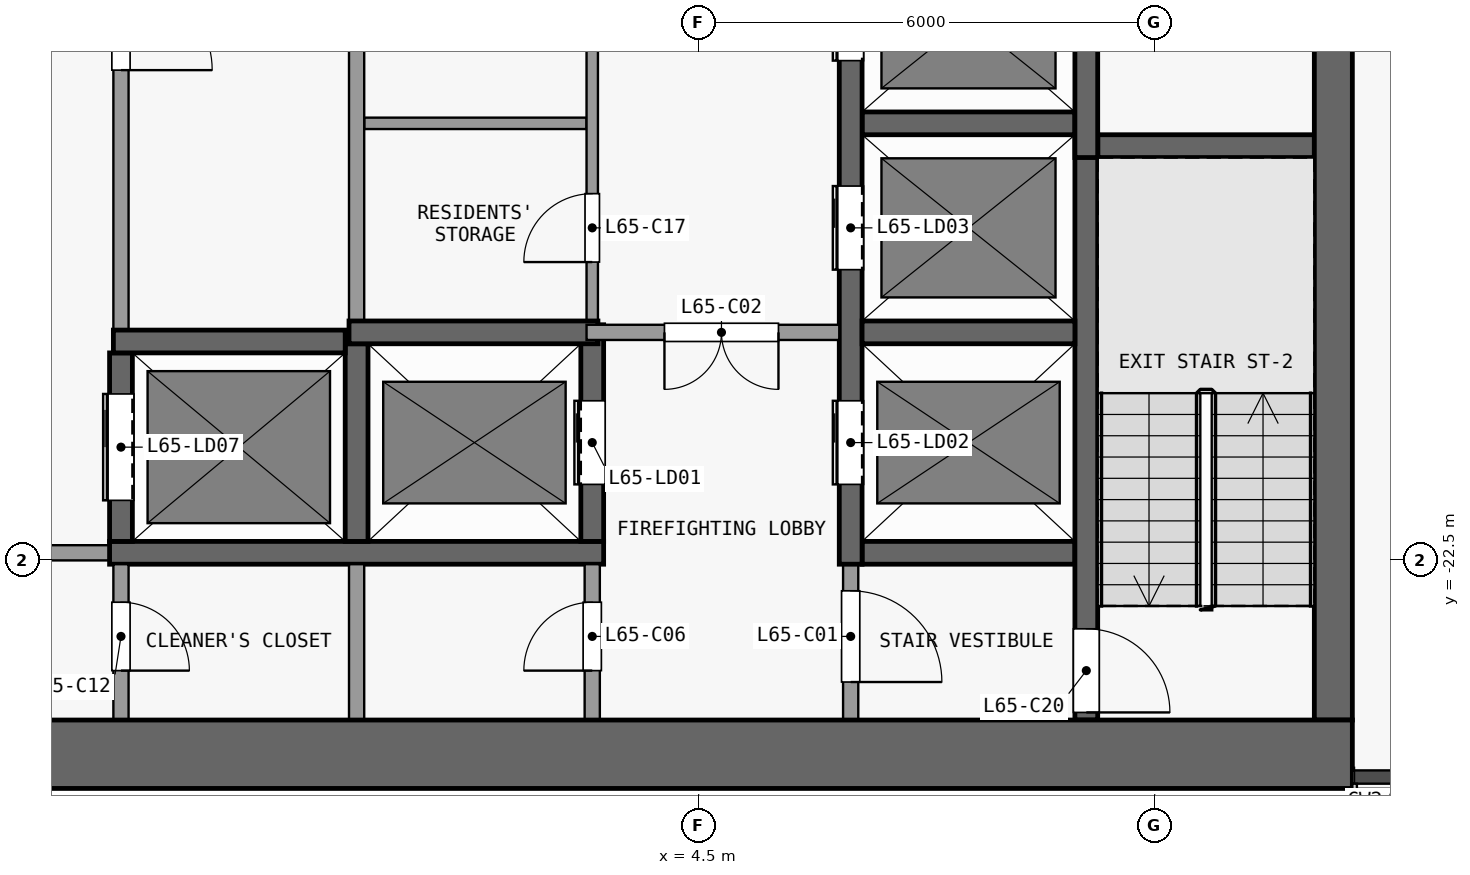
"""IFC4 building model, lengths in metres.
Left out: names, types, materials, properties, quantities, classifications, styles, units other than length and angle.
Written with IfcOpenShell. Run it as: python <this file> out.ifc"""

import sys

from ifc_helpers import new_model, si_unit, direction, frame, frame_2d, origin, place, context, subcontext, project, spatial, rectangle, extrude, element, fill, save


model = new_model("IFC4")
c1 = context("Model", 3, precision=1e-05, world=origin(), true_north=direction((0.0, 1.0)))
c2 = subcontext(c1, "Body", "Model", "MODEL_VIEW")
j1 = project(units=[si_unit("LENGTHUNIT", "METRE"), si_unit("PLANEANGLEUNIT", "RADIAN")], contexts=[c1])
p1 = place(None, origin())
s1 = spatial("IfcSite", under=j1, at=p1, CompositionType="ELEMENT")
p2 = place(p1, origin())
s2 = spatial("IfcBuilding", under=s1, at=p2, CompositionType="ELEMENT")
p3 = place(p2, frame((0.0, 0.0, 259.1)))
s3 = spatial("IfcBuildingStorey", under=s2, at=p3, CompositionType="ELEMENT", Elevation=259.1)
p4 = place(p3, frame((-13.1, -25.05, 0.0), z_axis=(0.0, 0.0, 1.0), x_axis=(1.0, 0.0, 0.0)))
e1 = element("IfcWall", 1, at=p4, inside=s3, PredefinedType="SHEAR", context=c2, shape_type="SweptSolid", body=[
    extrude(rectangle(XDim=26.2, YDim=0.9, at=frame_2d((13.1, 0.0))), origin(), (0.0, 0.0, 1.0), 3.3),
])
p5 = place(p3, frame((12.85, -24.6, 0.0), z_axis=(0.0, 0.0, 1.0), x_axis=(0.0, 1.0, 0.0)))
e2 = element("IfcWall", 2, at=p5, inside=s3, PredefinedType="SHEAR", context=c2, shape_type="SweptSolid", body=[
    extrude(rectangle(XDim=16.1, YDim=0.5, at=frame_2d((8.05, 0.0))), origin(), (0.0, 0.0, 1.0), 3.3),
])
p6 = place(p3, frame((-3.25, -22.4, 0.0), z_axis=(0.0, 0.0, 1.0), x_axis=(-1.0, 0.0, 0.0)))
e3 = element("IfcWall", 3, at=p6, inside=s3, PredefinedType="PARTITIONING", context=c2, shape_type="SweptSolid", body=[
    extrude(rectangle(XDim=6.2, YDim=0.2, at=frame_2d((3.1, 0.0))), origin(), (0.0, 0.0, 1.0), 3.3),
])
p7 = place(p6, frame((0.8, 0.0, 0.0)))
e4 = element("IfcOpeningElement", 4, at=p7, cuts=e3, PredefinedType="OPENING", context=c2, shape_type="SweptSolid", body=[
    extrude(rectangle(XDim=1.5, YDim=2.1, at=frame_2d((0.75, 1.05))), frame((0.0, 0.11, 0.0), z_axis=(0.0, -1.0, 0.0), x_axis=(1.0, 0.0, 0.0)), (0.0, 0.0, 1.0), 0.22),
])
p8 = place(p3, frame((-3.25, -22.4, 0.0), z_axis=(0.0, 0.0, 1.0), x_axis=(1.0, 0.0, 0.0)))
e5 = element("IfcWall", 5, at=p8, inside=s3, PredefinedType="SHEAR", context=c2, shape_type="SweptSolid", body=[
    extrude(rectangle(XDim=6.5, YDim=0.3, at=frame_2d((3.25, 0.0))), origin(), (0.0, 0.0, 1.0), 3.3),
])
p9 = place(p3, frame((6.65, -22.4, 0.0), z_axis=(0.0, 0.0, 1.0), x_axis=(1.0, 0.0, 0.0)))
e6 = element("IfcWall", 6, at=p9, inside=s3, PredefinedType="SHEAR", context=c2, shape_type="SweptSolid", body=[
    extrude(rectangle(XDim=2.8, YDim=0.3, at=frame_2d((1.4, 0.0))), origin(), (0.0, 0.0, 1.0), 3.3),
])
p10 = place(p3, frame((-3.2, -19.62, 0.0), z_axis=(0.0, 0.0, 1.0), x_axis=(1.0, 0.0, 0.0)))
e7 = element("IfcWall", 7, at=p10, inside=s3, PredefinedType="SHEAR", context=c2, shape_type="SweptSolid", body=[
    extrude(rectangle(XDim=3.05, YDim=0.3, at=frame_2d((1.525, 0.0))), origin(), (0.0, 0.0, 1.0), 3.3),
])
p11 = place(p3, frame((-0.1, -19.5, 0.0), z_axis=(0.0, 0.0, 1.0), x_axis=(1.0, 0.0, 0.0)))
e8 = element("IfcWall", 8, at=p11, inside=s3, PredefinedType="SHEAR", context=c2, shape_type="SweptSolid", body=[
    extrude(rectangle(XDim=3.275, YDim=0.3, at=frame_2d((1.638, 0.0))), origin(), (0.0, 0.0, 1.0), 3.3),
])
p12 = place(p3, frame((6.35, -19.5, 0.0), z_axis=(0.0, 0.0, 1.0), x_axis=(-1.0, 0.0, 0.0)))
e9 = element("IfcWall", 9, at=p12, inside=s3, PredefinedType="PARTITIONING", context=c2, shape_type="SweptSolid", body=[
    extrude(rectangle(XDim=3.325, YDim=0.2, at=frame_2d((1.663, 0.0))), origin(), (0.0, 0.0, 1.0), 3.3),
])
p13 = place(p12, frame((0.8, 0.0, 0.0)))
e10 = element("IfcOpeningElement", 10, at=p13, cuts=e9, PredefinedType="OPENING", context=c2, shape_type="SweptSolid", body=[
    extrude(rectangle(XDim=1.5, YDim=2.1, at=frame_2d((0.75, 1.05))), frame((0.0, 0.11, 0.0), z_axis=(0.0, -1.0, 0.0), x_axis=(1.0, 0.0, 0.0)), (0.0, 0.0, 1.0), 0.22),
])
p14 = place(p3, frame((6.65, -19.5, 0.0), z_axis=(0.0, 0.0, 1.0), x_axis=(1.0, 0.0, 0.0)))
e11 = element("IfcWall", 11, at=p14, inside=s3, PredefinedType="SHEAR", context=c2, shape_type="SweptSolid", body=[
    extrude(rectangle(XDim=2.8, YDim=0.3, at=frame_2d((1.4, 0.0))), origin(), (0.0, 0.0, 1.0), 3.3),
])
p15 = place(p3, frame((9.75, -17.05, 0.0), z_axis=(0.0, 0.0, 1.0), x_axis=(1.0, 0.0, 0.0)))
e12 = element("IfcWall", 12, at=p15, inside=s3, PredefinedType="SHEAR", context=c2, shape_type="SweptSolid", body=[
    extrude(rectangle(XDim=2.85, YDim=0.3, at=frame_2d((1.425, 0.0))), origin(), (0.0, 0.0, 1.0), 3.3),
])
p16 = place(p3, frame((0.1, -16.75, 0.0), z_axis=(0.0, 0.0, 1.0), x_axis=(1.0, 0.0, 0.0)))
e13 = element("IfcWall", 13, at=p16, inside=s3, PredefinedType="PARTITIONING", context=c2, shape_type="SweptSolid", body=[
    extrude(rectangle(XDim=2.925, YDim=0.15, at=frame_2d((1.462, 0.0))), origin(), (0.0, 0.0, 1.0), 3.3),
])
p17 = place(p3, frame((6.65, -16.75, 0.0), z_axis=(0.0, 0.0, 1.0), x_axis=(1.0, 0.0, 0.0)))
e14 = element("IfcWall", 14, at=p17, inside=s3, PredefinedType="SHEAR", context=c2, shape_type="SweptSolid", body=[
    extrude(rectangle(XDim=2.8, YDim=0.3, at=frame_2d((1.4, 0.0))), origin(), (0.0, 0.0, 1.0), 3.3),
])
p18 = place(p3, frame((-3.1, -22.55, 0.0), z_axis=(0.0, 0.0, 1.0), x_axis=(0.0, -1.0, 0.0)))
e15 = element("IfcWall", 15, at=p18, inside=s3, PredefinedType="PARTITIONING", context=c2, shape_type="SweptSolid", body=[
    extrude(rectangle(XDim=2.05, YDim=0.2, at=frame_2d((1.025, 0.0))), origin(), (0.0, 0.0, 1.0), 3.3),
])
p19 = place(p18, frame((0.5, 0.0, 0.0)))
e16 = element("IfcOpeningElement", 16, at=p19, cuts=e15, PredefinedType="OPENING", context=c2, shape_type="SweptSolid", body=[
    extrude(rectangle(XDim=0.9, YDim=2.1, at=frame_2d((0.45, 1.05))), frame((0.0, 0.11, 0.0), z_axis=(0.0, -1.0, 0.0), x_axis=(1.0, 0.0, 0.0)), (0.0, 0.0, 1.0), 0.22),
])
p20 = place(p3, frame((-3.1, -22.25, 0.0), z_axis=(0.0, 0.0, 1.0), x_axis=(0.0, 1.0, 0.0)))
e17 = element("IfcWall", 17, at=p20, inside=s3, PredefinedType="SHEAR", context=c2, shape_type="SweptSolid", body=[
    extrude(rectangle(XDim=2.48, YDim=0.3, at=frame_2d((1.24, 0.0))), origin(), (0.0, 0.0, 1.0), 3.3),
])
p21 = place(p20, frame((0.54, 0.0, 0.0)))
e18 = element("IfcOpeningElement", 18, at=p21, cuts=e17, PredefinedType="OPENING", context=c2, shape_type="SweptSolid", body=[
    extrude(rectangle(XDim=1.4, YDim=2.1, at=frame_2d((0.7, 1.05))), frame((0.0, 0.16, 0.0), z_axis=(0.0, -1.0, 0.0), x_axis=(1.0, 0.0, 0.0)), (0.0, 0.0, 1.0), 0.32),
])
p22 = place(p3, frame((-3.1, -8.5, 0.0), z_axis=(0.0, 0.0, 1.0), x_axis=(0.0, -1.0, 0.0)))
e19 = element("IfcWall", 19, at=p22, inside=s3, PredefinedType="PARTITIONING", context=c2, shape_type="SweptSolid", body=[
    extrude(rectangle(XDim=10.97, YDim=0.2, at=frame_2d((5.485, 0.0))), origin(), (0.0, 0.0, 1.0), 3.3),
])
p23 = place(p22, frame((6.35, 0.0, 0.0)))
e20 = element("IfcOpeningElement", 20, at=p23, cuts=e19, PredefinedType="OPENING", context=c2, shape_type="SweptSolid", body=[
    extrude(rectangle(XDim=1.2, YDim=2.1, at=frame_2d((0.6, 1.05))), frame((0.0, 0.11, 0.0), z_axis=(0.0, -1.0, 0.0), x_axis=(1.0, 0.0, 0.0)), (0.0, 0.0, 1.0), 0.22),
])
p24 = place(p22, frame((0.94, 0.0, 0.0)))
e21 = element("IfcOpeningElement", 21, at=p24, cuts=e19, PredefinedType="OPENING", context=c2, shape_type="SweptSolid", body=[
    extrude(rectangle(XDim=0.9, YDim=2.1, at=frame_2d((0.45, 1.05))), frame((0.0, 0.11, 0.0), z_axis=(0.0, -1.0, 0.0), x_axis=(1.0, 0.0, 0.0)), (0.0, 0.0, 1.0), 0.22),
])
p25 = place(p3, frame((0.0, -24.6, 0.0), z_axis=(0.0, 0.0, 1.0), x_axis=(0.0, 1.0, 0.0)))
e22 = element("IfcWall", 22, at=p25, inside=s3, PredefinedType="PARTITIONING", context=c2, shape_type="SweptSolid", body=[
    extrude(rectangle(XDim=2.05, YDim=0.2, at=frame_2d((1.025, 0.0))), origin(), (0.0, 0.0, 1.0), 3.3),
])
p26 = place(p3, frame((0.0, -22.25, 0.0), z_axis=(0.0, 0.0, 1.0), x_axis=(0.0, 1.0, 0.0)))
e23 = element("IfcWall", 23, at=p26, inside=s3, PredefinedType="SHEAR", context=c2, shape_type="SweptSolid", body=[
    extrude(rectangle(XDim=2.6, YDim=0.3, at=frame_2d((1.3, 0.0))), origin(), (0.0, 0.0, 1.0), 3.3),
])
p27 = place(p3, frame((0.0, -19.35, 0.0), z_axis=(0.0, 0.0, 1.0), x_axis=(0.0, 1.0, 0.0)))
e24 = element("IfcWall", 24, at=p27, inside=s3, PredefinedType="PARTITIONING", context=c2, shape_type="SweptSolid", body=[
    extrude(rectangle(XDim=10.85, YDim=0.2, at=frame_2d((5.425, 0.0))), origin(), (0.0, 0.0, 1.0), 3.3),
])
p28 = place(p3, frame((3.1, -24.6, 0.0), z_axis=(0.0, 0.0, 1.0), x_axis=(0.0, 1.0, 0.0)))
e25 = element("IfcWall", 25, at=p28, inside=s3, PredefinedType="PARTITIONING", context=c2, shape_type="SweptSolid", body=[
    extrude(rectangle(XDim=2.05, YDim=0.2, at=frame_2d((1.025, 0.0))), origin(), (0.0, 0.0, 1.0), 3.3),
])
p29 = place(p28, frame((0.65, 0.0, 0.0)))
e26 = element("IfcOpeningElement", 26, at=p29, cuts=e25, PredefinedType="OPENING", context=c2, shape_type="SweptSolid", body=[
    extrude(rectangle(XDim=0.9, YDim=2.1, at=frame_2d((0.45, 1.05))), frame((0.0, 0.11, 0.0), z_axis=(0.0, -1.0, 0.0), x_axis=(1.0, 0.0, 0.0)), (0.0, 0.0, 1.0), 0.22),
])
p30 = place(p3, frame((3.1, -22.25, 0.0), z_axis=(0.0, 0.0, 1.0), x_axis=(0.0, 1.0, 0.0)))
e27 = element("IfcWall", 27, at=p30, inside=s3, PredefinedType="SHEAR", context=c2, shape_type="SweptSolid", body=[
    extrude(rectangle(XDim=2.85, YDim=0.3, at=frame_2d((1.425, 0.0))), origin(), (0.0, 0.0, 1.0), 3.3),
])
p31 = place(p30, frame((0.75, 0.0, 0.0)))
e28 = element("IfcOpeningElement", 28, at=p31, cuts=e27, PredefinedType="OPENING", context=c2, shape_type="SweptSolid", body=[
    extrude(rectangle(XDim=1.1, YDim=2.1, at=frame_2d((0.55, 1.05))), frame((0.0, 0.16, 0.0), z_axis=(0.0, -1.0, 0.0), x_axis=(1.0, 0.0, 0.0)), (0.0, 0.0, 1.0), 0.32),
])
p32 = place(p3, frame((3.1, -19.4, 0.0), z_axis=(0.0, 0.0, 1.0), x_axis=(0.0, 1.0, 0.0)))
e29 = element("IfcWall", 29, at=p32, inside=s3, PredefinedType="PARTITIONING", context=c2, shape_type="SweptSolid", body=[
    extrude(rectangle(XDim=10.9, YDim=0.15, at=frame_2d((5.45, 0.0))), origin(), (0.0, 0.0, 1.0), 3.3),
])
p33 = place(p32, frame((0.825, 0.0, 0.0)))
e30 = element("IfcOpeningElement", 30, at=p33, cuts=e29, PredefinedType="OPENING", context=c2, shape_type="SweptSolid", body=[
    extrude(rectangle(XDim=0.9, YDim=2.1, at=frame_2d((0.45, 1.05))), frame((0.0, 0.085, 0.0), z_axis=(0.0, -1.0, 0.0), x_axis=(1.0, 0.0, 0.0)), (0.0, 0.0, 1.0), 0.17),
])
p34 = place(p32, frame((6.175, 0.0, 0.0)))
e31 = element("IfcOpeningElement", 31, at=p34, cuts=e29, PredefinedType="OPENING", context=c2, shape_type="SweptSolid", body=[
    extrude(rectangle(XDim=1.2, YDim=2.1, at=frame_2d((0.6, 1.05))), frame((0.0, 0.085, 0.0), z_axis=(0.0, -1.0, 0.0), x_axis=(1.0, 0.0, 0.0)), (0.0, 0.0, 1.0), 0.17),
])
p35 = place(p3, frame((6.5, -22.55, 0.0), z_axis=(0.0, 0.0, 1.0), x_axis=(0.0, -1.0, 0.0)))
e32 = element("IfcWall", 32, at=p35, inside=s3, PredefinedType="PARTITIONING", context=c2, shape_type="SweptSolid", body=[
    extrude(rectangle(XDim=2.05, YDim=0.2, at=frame_2d((1.025, 0.0))), origin(), (0.0, 0.0, 1.0), 3.3),
])
p36 = place(p35, frame((0.35, 0.0, 0.0)))
e33 = element("IfcOpeningElement", 33, at=p36, cuts=e32, PredefinedType="OPENING", context=c2, shape_type="SweptSolid", body=[
    extrude(rectangle(XDim=1.2, YDim=2.1, at=frame_2d((0.6, 1.05))), frame((0.0, 0.11, 0.0), z_axis=(0.0, -1.0, 0.0), x_axis=(1.0, 0.0, 0.0)), (0.0, 0.0, 1.0), 0.22),
])
p37 = place(p3, frame((6.5, -22.55, 0.0), z_axis=(0.0, 0.0, 1.0), x_axis=(0.0, 1.0, 0.0)))
e34 = element("IfcWall", 34, at=p37, inside=s3, PredefinedType="SHEAR", context=c2, shape_type="SweptSolid", body=[
    extrude(rectangle(XDim=14.05, YDim=0.3, at=frame_2d((7.025, 0.0))), origin(), (0.0, 0.0, 1.0), 3.3),
])
p38 = place(p37, frame((1.05, 0.0, 0.0)))
e35 = element("IfcOpeningElement", 35, at=p38, cuts=e34, PredefinedType="OPENING", context=c2, shape_type="SweptSolid", body=[
    extrude(rectangle(XDim=1.1, YDim=2.1, at=frame_2d((0.55, 1.05))), frame((0.0, 0.16, 0.0), z_axis=(0.0, -1.0, 0.0), x_axis=(1.0, 0.0, 0.0)), (0.0, 0.0, 1.0), 0.32),
])
p39 = place(p37, frame((3.875, 0.0, 0.0)))
e36 = element("IfcOpeningElement", 36, at=p39, cuts=e34, PredefinedType="OPENING", context=c2, shape_type="SweptSolid", body=[
    extrude(rectangle(XDim=1.1, YDim=2.1, at=frame_2d((0.55, 1.05))), frame((0.0, 0.16, 0.0), z_axis=(0.0, -1.0, 0.0), x_axis=(1.0, 0.0, 0.0)), (0.0, 0.0, 1.0), 0.32),
])
p40 = place(p37, frame((6.625, 0.0, 0.0)))
e37 = element("IfcOpeningElement", 37, at=p40, cuts=e34, PredefinedType="OPENING", context=c2, shape_type="SweptSolid", body=[
    extrude(rectangle(XDim=1.1, YDim=2.1, at=frame_2d((0.55, 1.05))), frame((0.0, 0.16, 0.0), z_axis=(0.0, -1.0, 0.0), x_axis=(1.0, 0.0, 0.0)), (0.0, 0.0, 1.0), 0.32),
])
p41 = place(p37, frame((9.375, 0.0, 0.0)))
e38 = element("IfcOpeningElement", 38, at=p41, cuts=e34, PredefinedType="OPENING", context=c2, shape_type="SweptSolid", body=[
    extrude(rectangle(XDim=1.1, YDim=2.1, at=frame_2d((0.55, 1.05))), frame((0.0, 0.16, 0.0), z_axis=(0.0, -1.0, 0.0), x_axis=(1.0, 0.0, 0.0)), (0.0, 0.0, 1.0), 0.32),
])
p42 = place(p37, frame((12.125, 0.0, 0.0)))
e39 = element("IfcOpeningElement", 39, at=p42, cuts=e34, PredefinedType="OPENING", context=c2, shape_type="SweptSolid", body=[
    extrude(rectangle(XDim=1.1, YDim=2.1, at=frame_2d((0.55, 1.05))), frame((0.0, 0.16, 0.0), z_axis=(0.0, -1.0, 0.0), x_axis=(1.0, 0.0, 0.0)), (0.0, 0.0, 1.0), 0.32),
])
p43 = place(p3, frame((9.6, -16.9, 0.0), z_axis=(0.0, 0.0, 1.0), x_axis=(0.0, -1.0, 0.0)))
e40 = element("IfcWall", 40, at=p43, inside=s3, PredefinedType="SHEAR", context=c2, shape_type="SweptSolid", body=[
    extrude(rectangle(XDim=7.7, YDim=0.3, at=frame_2d((3.85, 0.0))), origin(), (0.0, 0.0, 1.0), 3.3),
])
p44 = place(p43, frame((6.5, 0.0, 0.0)))
e41 = element("IfcOpeningElement", 41, at=p44, cuts=e40, PredefinedType="OPENING", context=c2, shape_type="SweptSolid", body=[
    extrude(rectangle(XDim=1.1, YDim=2.1, at=frame_2d((0.55, 1.05))), frame((0.0, 0.16, 0.0), z_axis=(0.0, -1.0, 0.0), x_axis=(1.0, 0.0, 0.0)), (0.0, 0.0, 1.0), 0.32),
])
p45 = place(p3, frame((9.6, -17.2, 0.0), z_axis=(0.0, 0.0, 1.0), x_axis=(0.0, 1.0, 0.0)))
e42 = element("IfcWall", 42, at=p45, inside=s3, PredefinedType="SHEAR", context=c2, shape_type="SweptSolid", body=[
    extrude(rectangle(XDim=8.7, YDim=0.3, at=frame_2d((4.35, 0.0))), origin(), (0.0, 0.0, 1.0), 3.3),
])
p46 = place(p31, origin())
e43 = element("IfcDoor", 43, at=p46, inside=s3, OperationType="DOUBLE_DOOR_SLIDING", PredefinedType="DOOR", context=c2, shape_type="SweptSolid", body=[
    extrude(rectangle(XDim=1.1, YDim=2.1, at=frame_2d((0.55, 1.05))), frame((0.0, 0.025, 0.0), z_axis=(0.0, -1.0, 0.0), x_axis=(1.0, 0.0, 0.0)), (0.0, 0.0, 1.0), 0.05),
])
fill(e28, e43)
p47 = place(p38, origin())
e44 = element("IfcDoor", 44, at=p47, inside=s3, OperationType="DOUBLE_DOOR_SLIDING", PredefinedType="DOOR", context=c2, shape_type="SweptSolid", body=[
    extrude(rectangle(XDim=1.1, YDim=2.1, at=frame_2d((0.55, 1.05))), frame((0.0, 0.025, 0.0), z_axis=(0.0, -1.0, 0.0), x_axis=(1.0, 0.0, 0.0)), (0.0, 0.0, 1.0), 0.05),
])
fill(e35, e44)
p48 = place(p39, origin())
e45 = element("IfcDoor", 45, at=p48, inside=s3, OperationType="DOUBLE_DOOR_SLIDING", PredefinedType="DOOR", context=c2, shape_type="SweptSolid", body=[
    extrude(rectangle(XDim=1.1, YDim=2.1, at=frame_2d((0.55, 1.05))), frame((0.0, 0.025, 0.0), z_axis=(0.0, -1.0, 0.0), x_axis=(1.0, 0.0, 0.0)), (0.0, 0.0, 1.0), 0.05),
])
fill(e36, e45)
p49 = place(p40, origin())
e46 = element("IfcDoor", 46, at=p49, inside=s3, OperationType="DOUBLE_DOOR_SLIDING", PredefinedType="DOOR", context=c2, shape_type="SweptSolid", body=[
    extrude(rectangle(XDim=1.1, YDim=2.1, at=frame_2d((0.55, 1.05))), frame((0.0, 0.025, 0.0), z_axis=(0.0, -1.0, 0.0), x_axis=(1.0, 0.0, 0.0)), (0.0, 0.0, 1.0), 0.05),
])
fill(e37, e46)
p50 = place(p21, origin())
e47 = element("IfcDoor", 47, at=p50, inside=s3, OperationType="DOUBLE_DOOR_SLIDING", PredefinedType="DOOR", context=c2, shape_type="SweptSolid", body=[
    extrude(rectangle(XDim=1.4, YDim=2.1, at=frame_2d((0.7, 1.05))), frame((0.0, 0.025, 0.0), z_axis=(0.0, -1.0, 0.0), x_axis=(1.0, 0.0, 0.0)), (0.0, 0.0, 1.0), 0.05),
])
fill(e18, e47)
p51 = place(p36, origin())
e48 = element("IfcDoor", 48, at=p51, inside=s3, OperationType="SINGLE_SWING_RIGHT", PredefinedType="DOOR", context=c2, shape_type="SweptSolid", body=[
    extrude(rectangle(XDim=1.2, YDim=2.1, at=frame_2d((0.6, 1.05))), frame((0.0, 0.025, 0.0), z_axis=(0.0, -1.0, 0.0), x_axis=(1.0, 0.0, 0.0)), (0.0, 0.0, 1.0), 0.05),
])
fill(e33, e48)
p52 = place(p13, origin())
e49 = element("IfcDoor", 49, at=p52, inside=s3, OperationType="DOUBLE_DOOR_SINGLE_SWING", PredefinedType="DOOR", context=c2, shape_type="SweptSolid", body=[
    extrude(rectangle(XDim=1.5, YDim=2.1, at=frame_2d((0.75, 1.05))), frame((0.0, 0.025, 0.0), z_axis=(0.0, -1.0, 0.0), x_axis=(1.0, 0.0, 0.0)), (0.0, 0.0, 1.0), 0.05),
])
fill(e10, e49)
p53 = place(p29, origin())
e50 = element("IfcDoor", 50, at=p53, inside=s3, OperationType="SINGLE_SWING_LEFT", PredefinedType="DOOR", context=c2, shape_type="SweptSolid", body=[
    extrude(rectangle(XDim=0.9, YDim=2.1, at=frame_2d((0.45, 1.05))), frame((0.0, 0.025, 0.0), z_axis=(0.0, -1.0, 0.0), x_axis=(1.0, 0.0, 0.0)), (0.0, 0.0, 1.0), 0.05),
])
fill(e26, e50)
p54 = place(p23, origin())
e51 = element("IfcDoor", 51, at=p54, inside=s3, OperationType="SINGLE_SWING_RIGHT", PredefinedType="DOOR", context=c2, shape_type="SweptSolid", body=[
    extrude(rectangle(XDim=1.2, YDim=2.1, at=frame_2d((0.6, 1.05))), frame((0.0, 0.025, 0.0), z_axis=(0.0, -1.0, 0.0), x_axis=(1.0, 0.0, 0.0)), (0.0, 0.0, 1.0), 0.05),
])
fill(e20, e51)
p55 = place(p19, origin())
e52 = element("IfcDoor", 52, at=p55, inside=s3, OperationType="SINGLE_SWING_RIGHT", PredefinedType="DOOR", context=c2, shape_type="SweptSolid", body=[
    extrude(rectangle(XDim=0.9, YDim=2.1, at=frame_2d((0.45, 1.05))), frame((0.0, 0.025, 0.0), z_axis=(0.0, -1.0, 0.0), x_axis=(1.0, 0.0, 0.0)), (0.0, 0.0, 1.0), 0.05),
])
fill(e16, e52)
p56 = place(p33, origin())
e53 = element("IfcDoor", 53, at=p56, inside=s3, OperationType="SINGLE_SWING_LEFT", PredefinedType="DOOR", context=c2, shape_type="SweptSolid", body=[
    extrude(rectangle(XDim=0.9, YDim=2.1, at=frame_2d((0.45, 1.05))), frame((0.0, 0.025, 0.0), z_axis=(0.0, -1.0, 0.0), x_axis=(1.0, 0.0, 0.0)), (0.0, 0.0, 1.0), 0.05),
])
fill(e30, e53)
p57 = place(p44, origin())
e54 = element("IfcDoor", 54, at=p57, inside=s3, OperationType="SINGLE_SWING_RIGHT", PredefinedType="DOOR", context=c2, shape_type="SweptSolid", body=[
    extrude(rectangle(XDim=1.1, YDim=2.1, at=frame_2d((0.55, 1.05))), frame((0.0, 0.025, 0.0), z_axis=(0.0, -1.0, 0.0), x_axis=(1.0, 0.0, 0.0)), (0.0, 0.0, 1.0), 0.05),
])
fill(e41, e54)
save(model, sys.argv[1])
